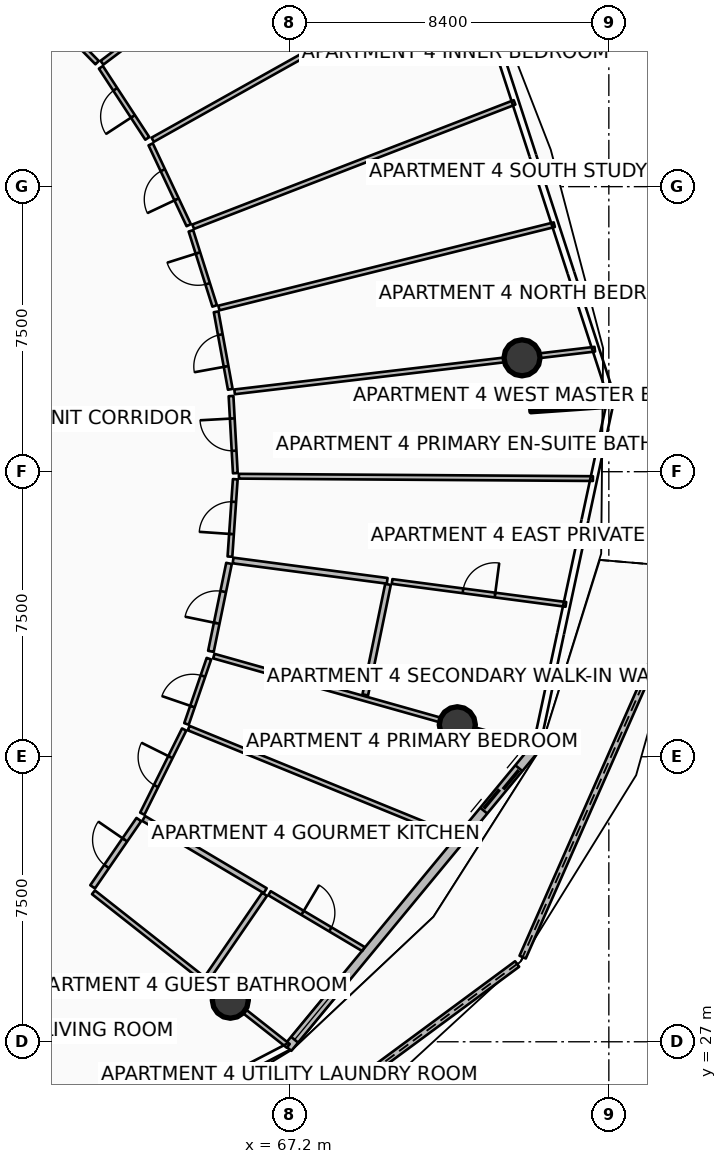
"""IFC4 building model, lengths in metres.
Left out: names, types, materials, properties, quantities, classifications, styles, units other than length and angle.
Written with IfcOpenShell. Run it as: python <this file> out.ifc"""

import sys

from ifc_helpers import new_model, si_unit, direction, frame, frame_2d, origin, origin_2d, place, context, subcontext, project, spatial, polyline, rectangle, circle, outline, extrude, element, fill, save


model = new_model("IFC4")
c1 = context("Model", 3, precision=1e-05, world=origin(), true_north=direction((0.0, 1.0)))
c2 = subcontext(c1, "Body", "Model", "MODEL_VIEW")
j1 = project(units=[si_unit("LENGTHUNIT", "METRE"), si_unit("PLANEANGLEUNIT", "RADIAN")], contexts=[c1])
p1 = place(None, origin())
s1 = spatial("IfcSite", under=j1, at=p1, CompositionType="ELEMENT")
p2 = place(p1, origin())
s2 = spatial("IfcBuilding", under=s1, at=p2, CompositionType="ELEMENT")
p3 = place(p2, frame((0.0, 0.0, 309.85)))
s3 = spatial("IfcBuildingStorey", under=s2, at=p3, CompositionType="ELEMENT", Elevation=309.85)
p4 = place(p3, frame((73.534, 43.785, 0.0), z_axis=(0.0, 0.0, 1.0), x_axis=(0.99755930726, 0.069824268692, 0.0)))
e1 = element("IfcWall", 1, at=p4, inside=s3, PredefinedType="SOLIDWALL", context=c2, shape_type="SweptSolid", body=[
    extrude(rectangle(XDim=3.5, YDim=0.42, at=frame_2d((1.75, 0.0))), origin(), (0.0, 0.0, 1.0), 3.85),
])
p5 = place(p3, frame((65.64, 28.094, 0.0), z_axis=(-0.249658820182, 0.19685540941, 0.948113084654), x_axis=(-0.619172052223, -0.785255353211, 0.0)))
e2 = element("IfcColumn", 2, at=p5, inside=s3, PredefinedType="COLUMN", context=c2, shape_type="SweptSolid", body=[
    extrude(circle(Radius=0.475, at=origin_2d()), origin(), (0.0, 0.0, 1.0), 3.639),
])
p6 = place(p3, frame((71.613, 35.341, 0.0), z_axis=(-0.330987533093, 0.093362273438, 0.939005185734), x_axis=(-0.271478522348, -0.96244449809, 0.0)))
e3 = element("IfcColumn", 3, at=p6, inside=s3, PredefinedType="COLUMN", context=c2, shape_type="SweptSolid", body=[
    extrude(circle(Radius=0.475, at=origin_2d()), origin(), (0.0, 0.0, 1.0), 3.674),
])
p7 = place(p3, frame((73.315, 44.996, 0.0), z_axis=(-0.353185583697, -0.041800241366, 0.934619004349), x_axis=(0.117531776266, -0.993069122251, 0.0)))
e4 = element("IfcColumn", 4, at=p7, inside=s3, PredefinedType="COLUMN", context=c2, shape_type="SweptSolid", body=[
    extrude(circle(Radius=0.475, at=origin_2d()), origin(), (0.0, 0.0, 1.0), 3.691),
])
p8 = place(p3, frame((64.651, 22.744, 0.0), z_axis=(0.0, 0.0, 1.0), x_axis=(0.804448153168, 0.594022868974, 0.0)))
e5 = element("IfcWall", 5, at=p8, inside=s3, PredefinedType="PARAPET", context=c2, shape_type="SweptSolid", body=[
    extrude(outline(polyline([(0.0, 0.0), (10.61, 0.0), (10.61, 1.832), (5.305, 1.696), (0.0, 1.497), (0.0, 0.0)])), frame((0.0, 0.09, 0.0), z_axis=(0.0, -1.0, 0.0), x_axis=(1.0, 0.0, 0.0)), (0.0, 0.0, 1.0), 0.18),
])
p9 = place(p3, frame((73.332, 29.227, 0.0), z_axis=(0.0, 0.0, 1.0), x_axis=(0.403444700503, 0.915004029301, 0.0)))
e6 = element("IfcWall", 6, at=p9, inside=s3, PredefinedType="PARAPET", context=c2, shape_type="SweptSolid", body=[
    extrude(outline(polyline([(0.0, 0.0), (11.191, 0.0), (11.191, 1.756), (5.596, 1.853), (0.0, 1.832), (0.0, 0.0)])), frame((0.0, 0.09, 0.0), z_axis=(0.0, -1.0, 0.0), x_axis=(1.0, 0.0, 0.0)), (0.0, 0.0, 1.0), 0.18),
])
p10 = place(p3, frame((67.153, 26.838, 0.0), z_axis=(0.0, 0.0, 1.0), x_axis=(0.636756692318, 0.77106479286, 0.0)))
e7 = element("IfcWall", 7, at=p10, inside=s3, PredefinedType="SOLIDWALL", context=c2, shape_type="SweptSolid", body=[
    extrude(rectangle(XDim=10.318, YDim=0.24, at=frame_2d((5.159, 0.0))), origin(), (0.0, 0.0, 1.0), 2.4),
])
p11 = place(p10, frame((8.098, 0.0, 0.0)))
e8 = element("IfcOpeningElement", 8, at=p11, cuts=e7, PredefinedType="OPENING", context=c2, shape_type="SweptSolid", body=[
    extrude(rectangle(XDim=1.45, YDim=2.15, at=frame_2d((0.725, 1.075))), frame((0.0, 0.13, 0.0), z_axis=(0.0, -1.0, 0.0), x_axis=(1.0, 0.0, 0.0)), (0.0, 0.0, 1.0), 0.26),
])
p12 = place(p10, frame((0.28, 0.0, 0.65)))
e9 = element("IfcOpeningElement", 9, at=p12, cuts=e7, PredefinedType="OPENING", context=c2, shape_type="SweptSolid", body=[
    extrude(rectangle(XDim=1.6, YDim=1.5, at=frame_2d((0.8, 0.75))), frame((0.0, 0.13, 0.0), z_axis=(0.0, -1.0, 0.0), x_axis=(1.0, 0.0, 0.0)), (0.0, 0.0, 1.0), 0.26),
])
p13 = place(p3, frame((62.038, 30.933, 0.0), z_axis=(0.0, 0.0, 1.0), x_axis=(0.785307629386, -0.619105748017, 0.0)))
e10 = element("IfcWall", 10, at=p13, inside=s3, PredefinedType="PARTITIONING", context=c2, shape_type="SweptSolid", body=[
    extrude(rectangle(XDim=6.528, YDim=0.125, at=frame_2d((3.264, 0.0))), origin(), (0.0, 0.0, 1.0), 2.407),
])
p14 = place(p3, frame((62.016, 31.077, 0.0), z_axis=(0.0, 0.0, 1.0), x_axis=(0.566089554618, 0.82434374878, 0.0)))
e11 = element("IfcWall", 11, at=p14, inside=s3, PredefinedType="PARTITIONING", context=c2, shape_type="SweptSolid", body=[
    extrude(rectangle(XDim=2.147, YDim=0.15, at=frame_2d((1.073, 0.0))), origin(), (0.0, 0.0, 1.0), 2.407),
])
p15 = place(p14, frame((0.648, 0.0, 0.0)))
e12 = element("IfcOpeningElement", 12, at=p15, cuts=e11, PredefinedType="OPENING", context=c2, shape_type="SweptSolid", body=[
    extrude(rectangle(XDim=0.85, YDim=2.06, at=frame_2d((0.425, 1.03))), frame((0.0, 0.085, 0.0), z_axis=(0.0, -1.0, 0.0), x_axis=(1.0, 0.0, 0.0)), (0.0, 0.0, 1.0), 0.17),
])
p16 = place(p3, frame((65.04, 28.694, 0.0), z_axis=(0.0, 0.0, 1.0), x_axis=(0.566157723222, 0.824296932201, 0.0)))
e13 = element("IfcWall", 13, at=p16, inside=s3, PredefinedType="PARTITIONING", context=c2, shape_type="SweptSolid", body=[
    extrude(rectangle(XDim=2.653, YDim=0.15, at=frame_2d((1.326, 0.0))), origin(), (0.0, 0.0, 1.0), 2.425),
])
p17 = place(p3, frame((63.36, 32.875, 0.0), z_axis=(0.0, 0.0, 1.0), x_axis=(0.859743082491, -0.510726768545, 0.0)))
e14 = element("IfcWall", 14, at=p17, inside=s3, PredefinedType="PARTITIONING", context=c2, shape_type="SweptSolid", body=[
    extrude(rectangle(XDim=3.72, YDim=0.15, at=frame_2d((1.86, 0.0))), origin(), (0.0, 0.0, 1.0), 2.425),
])
p18 = place(p3, frame((66.67, 30.909, 0.0), z_axis=(0.0, 0.0, 1.0), x_axis=(0.859769693766, -0.510681969216, 0.0)))
e15 = element("IfcWall", 15, at=p18, inside=s3, PredefinedType="PARTITIONING", context=c2, shape_type="SweptSolid", body=[
    extrude(rectangle(XDim=2.875, YDim=0.125, at=frame_2d((1.438, 0.0))), origin(), (0.0, 0.0, 1.0), 2.89),
])
p19 = place(p18, frame((1.012, 0.0, 0.0)))
e16 = element("IfcOpeningElement", 16, at=p19, cuts=e15, PredefinedType="OPENING", context=c2, shape_type="SweptSolid", body=[
    extrude(rectangle(XDim=0.85, YDim=2.06, at=frame_2d((0.425, 1.03))), frame((0.0, 0.073, 0.0), z_axis=(0.0, -1.0, 0.0), x_axis=(1.0, 0.0, 0.0)), (0.0, 0.0, 1.0), 0.145),
])
p20 = place(p3, frame((64.543, 35.254, 0.0), z_axis=(0.0, 0.0, 1.0), x_axis=(0.925976301028, -0.377581633471, 0.0)))
e17 = element("IfcWall", 17, at=p20, inside=s3, PredefinedType="PARTITIONING", context=c2, shape_type="SweptSolid", body=[
    extrude(rectangle(XDim=7.598, YDim=0.125, at=frame_2d((3.799, 0.0))), origin(), (0.0, 0.0, 1.0), 2.425),
])
p21 = place(p3, frame((63.323, 33.002, 0.0), z_axis=(0.0, 0.0, 1.0), x_axis=(0.445356978946, 0.895353093089, 0.0)))
e18 = element("IfcWall", 18, at=p21, inside=s3, PredefinedType="PARTITIONING", context=c2, shape_type="SweptSolid", body=[
    extrude(rectangle(XDim=2.473, YDim=0.125, at=frame_2d((1.237, 0.0))), origin(), (0.0, 0.0, 1.0), 2.89),
])
p22 = place(p21, frame((0.812, 0.0, 0.0)))
e19 = element("IfcOpeningElement", 19, at=p22, cuts=e18, PredefinedType="OPENING", context=c2, shape_type="SweptSolid", body=[
    extrude(rectangle(XDim=0.85, YDim=2.06, at=frame_2d((0.425, 1.03))), frame((0.0, 0.073, 0.0), z_axis=(0.0, -1.0, 0.0), x_axis=(1.0, 0.0, 0.0)), (0.0, 0.0, 1.0), 0.145),
])
p23 = place(p3, frame((64.486, 35.364, 0.0), z_axis=(0.0, 0.0, 1.0), x_axis=(0.325091045502, 0.945682722764, 0.0)))
e20 = element("IfcWall", 20, at=p23, inside=s3, PredefinedType="PARTITIONING", context=c2, shape_type="SweptSolid", body=[
    extrude(rectangle(XDim=1.815, YDim=0.125, at=frame_2d((0.908, 0.0))), origin(), (0.0, 0.0, 1.0), 2.407),
])
p24 = place(p23, frame((0.482, 0.0, 0.0)))
e21 = element("IfcOpeningElement", 21, at=p24, cuts=e20, PredefinedType="OPENING", context=c2, shape_type="SweptSolid", body=[
    extrude(rectangle(XDim=0.85, YDim=2.06, at=frame_2d((0.425, 1.03))), frame((0.0, 0.073, 0.0), z_axis=(0.0, -1.0, 0.0), x_axis=(1.0, 0.0, 0.0)), (0.0, 0.0, 1.0), 0.145),
])
p25 = place(p3, frame((65.205, 37.148, 0.0), z_axis=(0.0, 0.0, 1.0), x_axis=(0.962453251117, -0.27144748924, 0.0)))
e22 = element("IfcWall", 22, at=p25, inside=s3, PredefinedType="PARTITIONING", context=c2, shape_type="SweptSolid", body=[
    extrude(rectangle(XDim=8.692, YDim=0.125, at=frame_2d((4.346, 0.0))), origin(), (0.0, 0.0, 1.0), 2.407),
])
p26 = place(p3, frame((65.129, 37.273, 0.0), z_axis=(0.0, 0.0, 1.0), x_axis=(0.201597524987, 0.979468446617, 0.0)))
e23 = element("IfcWall", 23, at=p26, inside=s3, PredefinedType="PARTITIONING", context=c2, shape_type="SweptSolid", body=[
    extrude(rectangle(XDim=2.363, YDim=0.15, at=frame_2d((1.181, 0.0))), origin(), (0.0, 0.0, 1.0), 2.407),
])
p27 = place(p26, frame((0.756, 0.0, 0.0)))
e24 = element("IfcOpeningElement", 24, at=p27, cuts=e23, PredefinedType="OPENING", context=c2, shape_type="SweptSolid", body=[
    extrude(rectangle(XDim=0.85, YDim=2.06, at=frame_2d((0.425, 1.03))), frame((0.0, 0.085, 0.0), z_axis=(0.0, -1.0, 0.0), x_axis=(1.0, 0.0, 0.0)), (0.0, 0.0, 1.0), 0.17),
])
p28 = place(p3, frame((69.19, 36.127, 0.0), z_axis=(0.0, 0.0, 1.0), x_axis=(0.201648279835, 0.979457998711, 0.0)))
e25 = element("IfcWall", 25, at=p28, inside=s3, PredefinedType="PARTITIONING", context=c2, shape_type="SweptSolid", body=[
    extrude(rectangle(XDim=2.969, YDim=0.15, at=frame_2d((1.484, 0.0))), origin(), (0.0, 0.0, 1.0), 2.407),
])
p29 = place(p3, frame((65.712, 39.663, 0.0), z_axis=(0.0, 0.0, 1.0), x_axis=(0.991410965895, -0.130783396127, 0.0)))
e26 = element("IfcWall", 26, at=p29, inside=s3, PredefinedType="PARTITIONING", context=c2, shape_type="SweptSolid", body=[
    extrude(rectangle(XDim=4.09, YDim=0.15, at=frame_2d((2.045, 0.0))), origin(), (0.0, 0.0, 1.0), 2.89),
])
p30 = place(p3, frame((69.896, 39.111, 0.0), z_axis=(0.0, 0.0, 1.0), x_axis=(0.991414082931, -0.130759765088, 0.0)))
e27 = element("IfcWall", 27, at=p30, inside=s3, PredefinedType="PARTITIONING", context=c2, shape_type="SweptSolid", body=[
    extrude(rectangle(XDim=4.614, YDim=0.125, at=frame_2d((2.307, 0.0))), origin(), (0.0, 0.0, 1.0), 2.425),
])
p31 = place(p30, frame((1.882, 0.0, 0.0)))
e28 = element("IfcOpeningElement", 28, at=p31, cuts=e27, PredefinedType="OPENING", context=c2, shape_type="SweptSolid", body=[
    extrude(rectangle(XDim=0.85, YDim=2.06, at=frame_2d((0.425, 1.03))), frame((0.0, 0.073, 0.0), z_axis=(0.0, -1.0, 0.0), x_axis=(1.0, 0.0, 0.0)), (0.0, 0.0, 1.0), 0.145),
])
p32 = place(p3, frame((65.865, 41.881, 0.0), z_axis=(0.0, 0.0, 1.0), x_axis=(0.999977842534, -0.006656909239, 0.0)))
e29 = element("IfcWall", 29, at=p32, inside=s3, PredefinedType="PARTITIONING", context=c2, shape_type="SweptSolid", body=[
    extrude(rectangle(XDim=9.315, YDim=0.125, at=frame_2d((4.658, 0.0))), origin(), (0.0, 0.0, 1.0), 2.425),
])
p33 = place(p3, frame((65.629, 39.765, 0.0), z_axis=(0.0, 0.0, 1.0), x_axis=(0.068884177228, 0.997624663953, 0.0)))
e30 = element("IfcWall", 30, at=p33, inside=s3, PredefinedType="PARTITIONING", context=c2, shape_type="SweptSolid", body=[
    extrude(rectangle(XDim=2.042, YDim=0.125, at=frame_2d((1.021, 0.0))), origin(), (0.0, 0.0, 1.0), 2.89),
])
p34 = place(p33, frame((0.596, 0.0, 0.0)))
e31 = element("IfcOpeningElement", 31, at=p34, cuts=e30, PredefinedType="OPENING", context=c2, shape_type="SweptSolid", body=[
    extrude(rectangle(XDim=0.85, YDim=2.06, at=frame_2d((0.425, 1.03))), frame((0.0, 0.073, 0.0), z_axis=(0.0, -1.0, 0.0), x_axis=(1.0, 0.0, 0.0)), (0.0, 0.0, 1.0), 0.145),
])
p35 = place(p3, frame((65.771, 41.961, 0.0), z_axis=(0.0, 0.0, 1.0), x_axis=(-0.055523268632, 0.998457393503, 0.0)))
e32 = element("IfcWall", 32, at=p35, inside=s3, PredefinedType="PARTITIONING", context=c2, shape_type="SweptSolid", body=[
    extrude(rectangle(XDim=2.031, YDim=0.125, at=frame_2d((1.016, 0.0))), origin(), (0.0, 0.0, 1.0), 2.407),
])
p36 = place(p35, frame((0.591, 0.0, 0.0)))
e33 = element("IfcOpeningElement", 33, at=p36, cuts=e32, PredefinedType="OPENING", context=c2, shape_type="SweptSolid", body=[
    extrude(rectangle(XDim=0.85, YDim=2.06, at=frame_2d((0.425, 1.03))), frame((0.0, 0.073, 0.0), z_axis=(0.0, -1.0, 0.0), x_axis=(1.0, 0.0, 0.0)), (0.0, 0.0, 1.0), 0.145),
])
p37 = place(p3, frame((65.752, 44.101, 0.0), z_axis=(0.0, 0.0, 1.0), x_axis=(0.993067764639, 0.117543246658, 0.0)))
e34 = element("IfcWall", 34, at=p37, inside=s3, PredefinedType="PARTITIONING", context=c2, shape_type="SweptSolid", body=[
    extrude(rectangle(XDim=9.544, YDim=0.125, at=frame_2d((4.772, 0.0))), origin(), (0.0, 0.0, 1.0), 2.407),
])
p38 = place(p3, frame((65.339, 46.307, 0.0), z_axis=(0.0, 0.0, 1.0), x_axis=(0.970504630961, 0.241082478175, 0.0)))
e35 = element("IfcWall", 35, at=p38, inside=s3, PredefinedType="PARTITIONING", context=c2, shape_type="SweptSolid", body=[
    extrude(rectangle(XDim=9.094, YDim=0.125, at=frame_2d((4.547, 0.0))), origin(), (0.0, 0.0, 1.0), 2.425),
])
p39 = place(p3, frame((64.663, 48.446, 0.0), z_axis=(0.0, 0.0, 1.0), x_axis=(0.932642933348, 0.360800719062, 0.0)))
e36 = element("IfcWall", 36, at=p39, inside=s3, PredefinedType="PARTITIONING", context=c2, shape_type="SweptSolid", body=[
    extrude(rectangle(XDim=9.067, YDim=0.125, at=frame_2d((4.534, 0.0))), origin(), (0.0, 0.0, 1.0), 2.425),
])
p40 = place(p3, frame((65.638, 44.168, 0.0), z_axis=(0.0, 0.0, 1.0), x_axis=(-0.179642120357, 0.983732030887, 0.0)))
e37 = element("IfcWall", 37, at=p40, inside=s3, PredefinedType="PARTITIONING", context=c2, shape_type="SweptSolid", body=[
    extrude(rectangle(XDim=2.073, YDim=0.125, at=frame_2d((1.036, 0.0))), origin(), (0.0, 0.0, 1.0), 2.407),
])
p41 = place(p40, frame((0.611, 0.0, 0.0)))
e38 = element("IfcOpeningElement", 38, at=p41, cuts=e37, PredefinedType="OPENING", context=c2, shape_type="SweptSolid", body=[
    extrude(rectangle(XDim=0.85, YDim=2.06, at=frame_2d((0.425, 1.03))), frame((0.0, 0.073, 0.0), z_axis=(0.0, -1.0, 0.0), x_axis=(1.0, 0.0, 0.0)), (0.0, 0.0, 1.0), 0.145),
])
p42 = place(p3, frame((65.228, 46.362, 0.0), z_axis=(0.0, 0.0, 1.0), x_axis=(-0.301520440564, 0.953459712795, 0.0)))
e39 = element("IfcWall", 39, at=p42, inside=s3, PredefinedType="PARTITIONING", context=c2, shape_type="SweptSolid", body=[
    extrude(rectangle(XDim=2.072, YDim=0.125, at=frame_2d((1.036, 0.0))), origin(), (0.0, 0.0, 1.0), 2.89),
])
p43 = place(p42, frame((0.611, 0.0, 0.0)))
e40 = element("IfcOpeningElement", 40, at=p43, cuts=e39, PredefinedType="OPENING", context=c2, shape_type="SweptSolid", body=[
    extrude(rectangle(XDim=0.85, YDim=2.06, at=frame_2d((0.425, 1.03))), frame((0.0, 0.073, 0.0), z_axis=(0.0, -1.0, 0.0), x_axis=(1.0, 0.0, 0.0)), (0.0, 0.0, 1.0), 0.145),
])
p44 = place(p3, frame((64.544, 48.486, 0.0), z_axis=(0.0, 0.0, 1.0), x_axis=(-0.425692004013, 0.904868121728, 0.0)))
e41 = element("IfcWall", 41, at=p44, inside=s3, PredefinedType="PARTITIONING", context=c2, shape_type="SweptSolid", body=[
    extrude(rectangle(XDim=2.351, YDim=0.125, at=frame_2d((1.175, 0.0))), origin(), (0.0, 0.0, 1.0), 2.407),
])
p45 = place(p44, frame((0.75, 0.0, 0.0)))
e42 = element("IfcOpeningElement", 42, at=p45, cuts=e41, PredefinedType="OPENING", context=c2, shape_type="SweptSolid", body=[
    extrude(rectangle(XDim=0.85, YDim=2.06, at=frame_2d((0.425, 1.03))), frame((0.0, 0.073, 0.0), z_axis=(0.0, -1.0, 0.0), x_axis=(1.0, 0.0, 0.0)), (0.0, 0.0, 1.0), 0.145),
])
p46 = place(p3, frame((63.597, 50.735, 0.0), z_axis=(0.0, 0.0, 1.0), x_axis=(0.872500345179, 0.48861349517, 0.0)))
e43 = element("IfcWall", 43, at=p46, inside=s3, PredefinedType="PARTITIONING", context=c2, shape_type="SweptSolid", body=[
    extrude(rectangle(XDim=9.544, YDim=0.125, at=frame_2d((4.772, 0.0))), origin(), (0.0, 0.0, 1.0), 2.407),
])
p47 = place(p3, frame((62.262, 52.761, 0.0), z_axis=(0.0, 0.0, 1.0), x_axis=(0.798277470684, 0.602289863603, 0.0)))
e44 = element("IfcWall", 44, at=p47, inside=s3, PredefinedType="PARTITIONING", context=c2, shape_type="SweptSolid", body=[
    extrude(rectangle(XDim=9.253, YDim=0.125, at=frame_2d((4.626, 0.0))), origin(), (0.0, 0.0, 1.0), 2.425),
])
p48 = place(p3, frame((63.455, 50.769, 0.0), z_axis=(0.0, 0.0, 1.0), x_axis=(-0.546754496642, 0.837292971666, 0.0)))
e45 = element("IfcWall", 45, at=p48, inside=s3, PredefinedType="PARTITIONING", context=c2, shape_type="SweptSolid", body=[
    extrude(rectangle(XDim=2.234, YDim=0.125, at=frame_2d((1.117, 0.0))), origin(), (0.0, 0.0, 1.0), 2.407),
])
p49 = place(p48, frame((0.692, 0.0, 0.0)))
e46 = element("IfcOpeningElement", 46, at=p49, cuts=e45, PredefinedType="OPENING", context=c2, shape_type="SweptSolid", body=[
    extrude(rectangle(XDim=0.85, YDim=2.06, at=frame_2d((0.425, 1.03))), frame((0.0, 0.073, 0.0), z_axis=(0.0, -1.0, 0.0), x_axis=(1.0, 0.0, 0.0)), (0.0, 0.0, 1.0), 0.145),
])
p50 = place(p3, frame((62.134, 52.764, 0.0), z_axis=(0.0, 0.0, 1.0), x_axis=(-0.699585598454, 0.714548801997, 0.0)))
e47 = element("IfcWall", 47, at=p50, inside=s3, PredefinedType="PARTITIONING", context=c2, shape_type="SweptSolid", body=[
    extrude(rectangle(XDim=4.373, YDim=0.125, at=frame_2d((2.187, 0.0))), origin(), (0.0, 0.0, 1.0), 2.407),
])
p51 = place(p50, frame((1.736, 0.0, 0.0)))
e48 = element("IfcOpeningElement", 48, at=p51, cuts=e47, PredefinedType="OPENING", context=c2, shape_type="SweptSolid", body=[
    extrude(rectangle(XDim=0.9, YDim=2.08, at=frame_2d((0.45, 1.04))), frame((0.0, 0.073, 0.0), z_axis=(0.0, -1.0, 0.0), x_axis=(1.0, 0.0, 0.0)), (0.0, 0.0, 1.0), 0.145),
])
p52 = place(p11, origin())
e49 = element("IfcDoor", 49, at=p52, inside=s3, OperationType="DOUBLE_DOOR_SLIDING", PredefinedType="DOOR", context=c2, shape_type="SweptSolid", body=[
    extrude(rectangle(XDim=1.45, YDim=2.15, at=frame_2d((0.725, 1.075))), frame((0.0, 0.025, 0.0), z_axis=(0.0, -1.0, 0.0), x_axis=(1.0, 0.0, 0.0)), (0.0, 0.0, 1.0), 0.05),
])
fill(e8, e49)
p53 = place(p12, origin())
e50 = element("IfcWindow", 50, at=p53, inside=s3, PartitioningType="SINGLE_PANEL", PredefinedType="WINDOW", context=c2, shape_type="SweptSolid", body=[
    extrude(rectangle(XDim=1.6, YDim=1.5, at=frame_2d((0.8, 0.75))), frame((0.0, 0.03, 0.0), z_axis=(0.0, -1.0, 0.0), x_axis=(1.0, 0.0, 0.0)), (0.0, 0.0, 1.0), 0.06),
])
fill(e9, e50)
p54 = place(p15, origin())
e51 = element("IfcDoor", 51, at=p54, inside=s3, OperationType="SINGLE_SWING_RIGHT", PredefinedType="DOOR", context=c2, shape_type="SweptSolid", body=[
    extrude(rectangle(XDim=0.85, YDim=2.06, at=frame_2d((0.425, 1.03))), frame((0.0, 0.025, 0.0), z_axis=(0.0, -1.0, 0.0), x_axis=(1.0, 0.0, 0.0)), (0.0, 0.0, 1.0), 0.05),
])
fill(e12, e51)
p55 = place(p19, origin())
e52 = element("IfcDoor", 52, at=p55, inside=s3, OperationType="SINGLE_SWING_LEFT", PredefinedType="DOOR", context=c2, shape_type="SweptSolid", body=[
    extrude(rectangle(XDim=0.85, YDim=2.06, at=frame_2d((0.425, 1.03))), frame((0.0, 0.025, 0.0), z_axis=(0.0, -1.0, 0.0), x_axis=(1.0, 0.0, 0.0)), (0.0, 0.0, 1.0), 0.05),
])
fill(e16, e52)
p56 = place(p22, origin())
e53 = element("IfcDoor", 53, at=p56, inside=s3, OperationType="SINGLE_SWING_RIGHT", PredefinedType="DOOR", context=c2, shape_type="SweptSolid", body=[
    extrude(rectangle(XDim=0.85, YDim=2.06, at=frame_2d((0.425, 1.03))), frame((0.0, 0.025, 0.0), z_axis=(0.0, -1.0, 0.0), x_axis=(1.0, 0.0, 0.0)), (0.0, 0.0, 1.0), 0.05),
])
fill(e19, e53)
p57 = place(p24, origin())
e54 = element("IfcDoor", 54, at=p57, inside=s3, OperationType="SINGLE_SWING_LEFT", PredefinedType="DOOR", context=c2, shape_type="SweptSolid", body=[
    extrude(rectangle(XDim=0.85, YDim=2.06, at=frame_2d((0.425, 1.03))), frame((0.0, 0.025, 0.0), z_axis=(0.0, -1.0, 0.0), x_axis=(1.0, 0.0, 0.0)), (0.0, 0.0, 1.0), 0.05),
])
fill(e21, e54)
p58 = place(p27, origin())
e55 = element("IfcDoor", 55, at=p58, inside=s3, OperationType="SINGLE_SWING_LEFT", PredefinedType="DOOR", context=c2, shape_type="SweptSolid", body=[
    extrude(rectangle(XDim=0.85, YDim=2.06, at=frame_2d((0.425, 1.03))), frame((0.0, 0.025, 0.0), z_axis=(0.0, -1.0, 0.0), x_axis=(1.0, 0.0, 0.0)), (0.0, 0.0, 1.0), 0.05),
])
fill(e24, e55)
p59 = place(p31, origin())
e56 = element("IfcDoor", 56, at=p59, inside=s3, OperationType="SINGLE_SWING_RIGHT", PredefinedType="DOOR", context=c2, shape_type="SweptSolid", body=[
    extrude(rectangle(XDim=0.85, YDim=2.06, at=frame_2d((0.425, 1.03))), frame((0.0, 0.025, 0.0), z_axis=(0.0, -1.0, 0.0), x_axis=(1.0, 0.0, 0.0)), (0.0, 0.0, 1.0), 0.05),
])
fill(e28, e56)
p60 = place(p34, origin())
e57 = element("IfcDoor", 57, at=p60, inside=s3, OperationType="SINGLE_SWING_LEFT", PredefinedType="DOOR", context=c2, shape_type="SweptSolid", body=[
    extrude(rectangle(XDim=0.85, YDim=2.06, at=frame_2d((0.425, 1.03))), frame((0.0, 0.025, 0.0), z_axis=(0.0, -1.0, 0.0), x_axis=(1.0, 0.0, 0.0)), (0.0, 0.0, 1.0), 0.05),
])
fill(e31, e57)
p61 = place(p36, origin())
e58 = element("IfcDoor", 58, at=p61, inside=s3, OperationType="SINGLE_SWING_RIGHT", PredefinedType="DOOR", context=c2, shape_type="SweptSolid", body=[
    extrude(rectangle(XDim=0.85, YDim=2.06, at=frame_2d((0.425, 1.03))), frame((0.0, 0.025, 0.0), z_axis=(0.0, -1.0, 0.0), x_axis=(1.0, 0.0, 0.0)), (0.0, 0.0, 1.0), 0.05),
])
fill(e33, e58)
p62 = place(p41, origin())
e59 = element("IfcDoor", 59, at=p62, inside=s3, OperationType="SINGLE_SWING_LEFT", PredefinedType="DOOR", context=c2, shape_type="SweptSolid", body=[
    extrude(rectangle(XDim=0.85, YDim=2.06, at=frame_2d((0.425, 1.03))), frame((0.0, 0.025, 0.0), z_axis=(0.0, -1.0, 0.0), x_axis=(1.0, 0.0, 0.0)), (0.0, 0.0, 1.0), 0.05),
])
fill(e38, e59)
p63 = place(p43, origin())
e60 = element("IfcDoor", 60, at=p63, inside=s3, OperationType="SINGLE_SWING_RIGHT", PredefinedType="DOOR", context=c2, shape_type="SweptSolid", body=[
    extrude(rectangle(XDim=0.85, YDim=2.06, at=frame_2d((0.425, 1.03))), frame((0.0, 0.025, 0.0), z_axis=(0.0, -1.0, 0.0), x_axis=(1.0, 0.0, 0.0)), (0.0, 0.0, 1.0), 0.05),
])
fill(e40, e60)
p64 = place(p45, origin())
e61 = element("IfcDoor", 61, at=p64, inside=s3, OperationType="SINGLE_SWING_LEFT", PredefinedType="DOOR", context=c2, shape_type="SweptSolid", body=[
    extrude(rectangle(XDim=0.85, YDim=2.06, at=frame_2d((0.425, 1.03))), frame((0.0, 0.025, 0.0), z_axis=(0.0, -1.0, 0.0), x_axis=(1.0, 0.0, 0.0)), (0.0, 0.0, 1.0), 0.05),
])
fill(e42, e61)
p65 = place(p49, origin())
e62 = element("IfcDoor", 62, at=p65, inside=s3, OperationType="SINGLE_SWING_LEFT", PredefinedType="DOOR", context=c2, shape_type="SweptSolid", body=[
    extrude(rectangle(XDim=0.85, YDim=2.06, at=frame_2d((0.425, 1.03))), frame((0.0, 0.025, 0.0), z_axis=(0.0, -1.0, 0.0), x_axis=(1.0, 0.0, 0.0)), (0.0, 0.0, 1.0), 0.05),
])
fill(e46, e62)
save(model, sys.argv[1])
